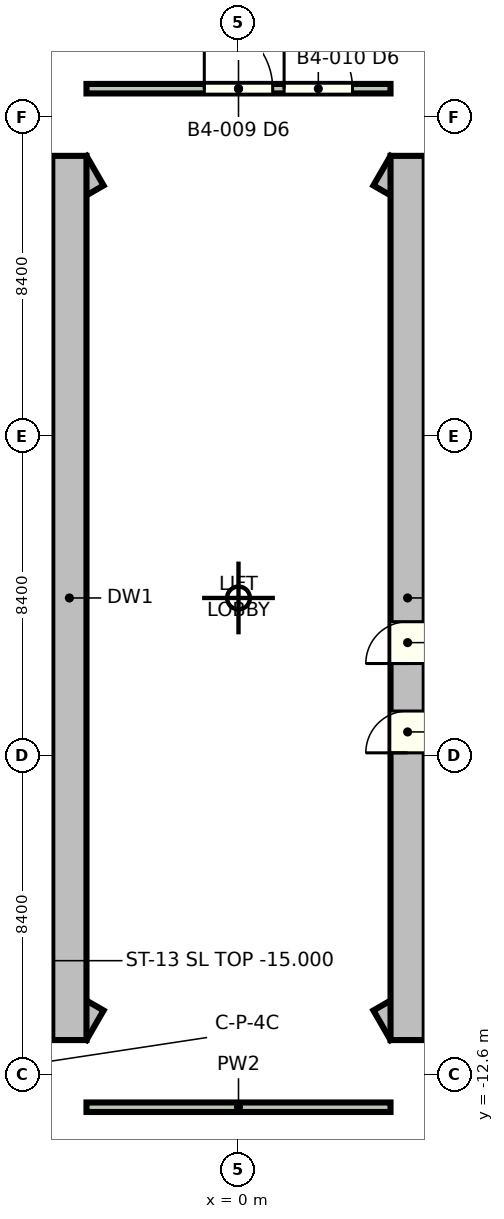
"""IFC4 building model, lengths in metres.
Left out: names, types, materials, properties, quantities, classifications, styles, units other than length and angle.
Written with IfcOpenShell. Run it as: python <this file> out.ifc"""

import sys

from ifc_helpers import new_model, si_unit, direction, frame, frame_2d, origin, place, context, subcontext, project, spatial, rectangle, extrude, element, fill, save


model = new_model("IFC4")
c1 = context("Model", 3, precision=1e-05, world=origin(), true_north=direction((0.0, 1.0)))
c2 = subcontext(c1, "Body", "Model", "MODEL_VIEW")
j1 = project(units=[si_unit("LENGTHUNIT", "METRE"), si_unit("PLANEANGLEUNIT", "RADIAN")], contexts=[c1])
p1 = place(None, origin())
s1 = spatial("IfcSite", under=j1, at=p1, CompositionType="ELEMENT")
p2 = place(p1, origin())
s2 = spatial("IfcBuilding", under=s1, at=p2, CompositionType="ELEMENT")
p3 = place(p2, frame((0.0, 0.0, -17.0)))
s3 = spatial("IfcBuildingStorey", under=s2, at=p3, CompositionType="ELEMENT", Elevation=-17.0)
for number, where, z_axis, x_axis in (
    (1, (-3.775, -11.243, 0.0), (0.0, 0.0, 1.0), (-0.866, 0.5, 0.0)),
    (2, (-8.614, 8.449, 0.0), (0.0, 0.0, 1.0), (0.866, 0.5, 0.0)),
):
    element("IfcWall", number, at=place(p3, frame(where, z_axis=z_axis, x_axis=x_axis)), inside=s3, PredefinedType="SHEAR", context=c2, shape_type="SweptSolid", body=[
        extrude(rectangle(XDim=5.587, YDim=0.9, at=frame_2d((2.794, 0.0))), origin(), (0.0, 0.0, 1.0), 3.7),
    ])
p4 = place(p3, frame((-4.45, 11.633, 0.0), z_axis=(0.0, 0.0, 1.0), x_axis=(0.0, -1.0, 0.0)))
e3 = element("IfcWall", 3, at=p4, inside=s3, PredefinedType="SHEAR", context=c2, shape_type="SweptSolid", body=[
    extrude(rectangle(XDim=23.265, YDim=0.9, at=frame_2d((11.633, 0.0))), origin(), (0.0, 0.0, 1.0), 3.7),
])
for number, where, z_axis, x_axis in (
    (4, (3.775, 11.243, 0.0), (0.0, 0.0, 1.0), (0.866, -0.5, 0.0)),
    (5, (8.614, -8.449, 0.0), (0.0, 0.0, 1.0), (-0.866, -0.5, 0.0)),
):
    element("IfcWall", number, at=place(p3, frame(where, z_axis=z_axis, x_axis=x_axis)), inside=s3, PredefinedType="SHEAR", context=c2, shape_type="SweptSolid", body=[
        extrude(rectangle(XDim=5.587, YDim=0.9, at=frame_2d((2.794, 0.0))), origin(), (0.0, 0.0, 1.0), 3.7),
    ])
p5 = place(p3, frame((4.45, -11.633, 0.0), z_axis=(0.0, 0.0, 1.0), x_axis=(0.0, 1.0, 0.0)))
e6 = element("IfcWall", 6, at=p5, inside=s3, PredefinedType="SHEAR", context=c2, shape_type="SweptSolid", body=[
    extrude(rectangle(XDim=23.265, YDim=0.9, at=frame_2d((11.633, 0.0))), origin(), (0.0, 0.0, 1.0), 3.7),
])
p6 = place(p5, frame((7.558, 0.0, 0.0)))
e7 = element("IfcOpeningElement", 7, at=p6, cuts=e6, PredefinedType="OPENING", context=c2, shape_type="SweptSolid", body=[
    extrude(rectangle(XDim=1.1, YDim=2.1, at=frame_2d((0.55, 1.05))), frame((0.0, 0.46, 0.0), z_axis=(0.0, -1.0, 0.0), x_axis=(1.0, 0.0, 0.0)), (0.0, 0.0, 1.0), 0.92),
])
p7 = place(p5, frame((9.907, 0.0, 0.0)))
e8 = element("IfcOpeningElement", 8, at=p7, cuts=e6, PredefinedType="OPENING", context=c2, shape_type="SweptSolid", body=[
    extrude(rectangle(XDim=1.1, YDim=2.1, at=frame_2d((0.55, 1.05))), frame((0.0, 0.46, 0.0), z_axis=(0.0, -1.0, 0.0), x_axis=(1.0, 0.0, 0.0)), (0.0, 0.0, 1.0), 0.92),
])
p8 = place(p3, frame((-4.0, 13.4, 0.0), z_axis=(0.0, 0.0, 1.0), x_axis=(1.0, 0.0, 0.0)))
e9 = element("IfcWall", 9, at=p8, inside=s3, PredefinedType="PARTITIONING", context=c2, shape_type="SweptSolid", body=[
    extrude(rectangle(XDim=8.0, YDim=0.25, at=frame_2d((4.0, 0.0))), origin(), (0.0, 0.0, 1.0), 3.7),
])
p9 = place(p8, frame((3.1, 0.0, 0.0)))
e10 = element("IfcOpeningElement", 10, at=p9, cuts=e9, PredefinedType="OPENING", context=c2, shape_type="SweptSolid", body=[
    extrude(rectangle(XDim=1.8, YDim=2.1, at=frame_2d((0.9, 1.05))), frame((0.0, 0.135, 0.0), z_axis=(0.0, -1.0, 0.0), x_axis=(1.0, 0.0, 0.0)), (0.0, 0.0, 1.0), 0.27),
])
p10 = place(p8, frame((5.2, 0.0, 0.0)))
e11 = element("IfcOpeningElement", 11, at=p10, cuts=e9, PredefinedType="OPENING", context=c2, shape_type="SweptSolid", body=[
    extrude(rectangle(XDim=1.8, YDim=2.1, at=frame_2d((0.9, 1.05))), frame((0.0, 0.135, 0.0), z_axis=(0.0, -1.0, 0.0), x_axis=(1.0, 0.0, 0.0)), (0.0, 0.0, 1.0), 0.27),
])
p11 = place(p3, frame((-4.0, -13.4, 0.0), z_axis=(0.0, 0.0, 1.0), x_axis=(1.0, 0.0, 0.0)))
e12 = element("IfcWall", 12, at=p11, inside=s3, PredefinedType="PARTITIONING", context=c2, shape_type="SweptSolid", body=[
    extrude(rectangle(XDim=8.0, YDim=0.25, at=frame_2d((4.0, 0.0))), origin(), (0.0, 0.0, 1.0), 3.7),
])
p12 = place(p6, origin())
e13 = element("IfcDoor", 13, at=p12, inside=s3, OperationType="SLIDING_TO_LEFT", PredefinedType="DOOR", context=c2, shape_type="SweptSolid", body=[
    extrude(rectangle(XDim=1.1, YDim=2.1, at=frame_2d((0.55, 1.05))), frame((0.0, 0.025, 0.0), z_axis=(0.0, -1.0, 0.0), x_axis=(1.0, 0.0, 0.0)), (0.0, 0.0, 1.0), 0.05),
])
fill(e7, e13)
p13 = place(p7, origin())
e14 = element("IfcDoor", 14, at=p13, inside=s3, OperationType="SLIDING_TO_LEFT", PredefinedType="DOOR", context=c2, shape_type="SweptSolid", body=[
    extrude(rectangle(XDim=1.1, YDim=2.1, at=frame_2d((0.55, 1.05))), frame((0.0, 0.025, 0.0), z_axis=(0.0, -1.0, 0.0), x_axis=(1.0, 0.0, 0.0)), (0.0, 0.0, 1.0), 0.05),
])
fill(e8, e14)
p14 = place(p9, origin())
e15 = element("IfcDoor", 15, at=p14, inside=s3, OperationType="DOUBLE_DOOR_SINGLE_SWING", PredefinedType="DOOR", context=c2, shape_type="SweptSolid", body=[
    extrude(rectangle(XDim=1.8, YDim=2.1, at=frame_2d((0.9, 1.05))), frame((0.0, 0.025, 0.0), z_axis=(0.0, -1.0, 0.0), x_axis=(1.0, 0.0, 0.0)), (0.0, 0.0, 1.0), 0.05),
])
fill(e10, e15)
p15 = place(p10, origin())
e16 = element("IfcDoor", 16, at=p15, inside=s3, OperationType="DOUBLE_DOOR_SINGLE_SWING", PredefinedType="DOOR", context=c2, shape_type="SweptSolid", body=[
    extrude(rectangle(XDim=1.8, YDim=2.1, at=frame_2d((0.9, 1.05))), frame((0.0, 0.025, 0.0), z_axis=(0.0, -1.0, 0.0), x_axis=(1.0, 0.0, 0.0)), (0.0, 0.0, 1.0), 0.05),
])
fill(e11, e16)
save(model, sys.argv[1])
